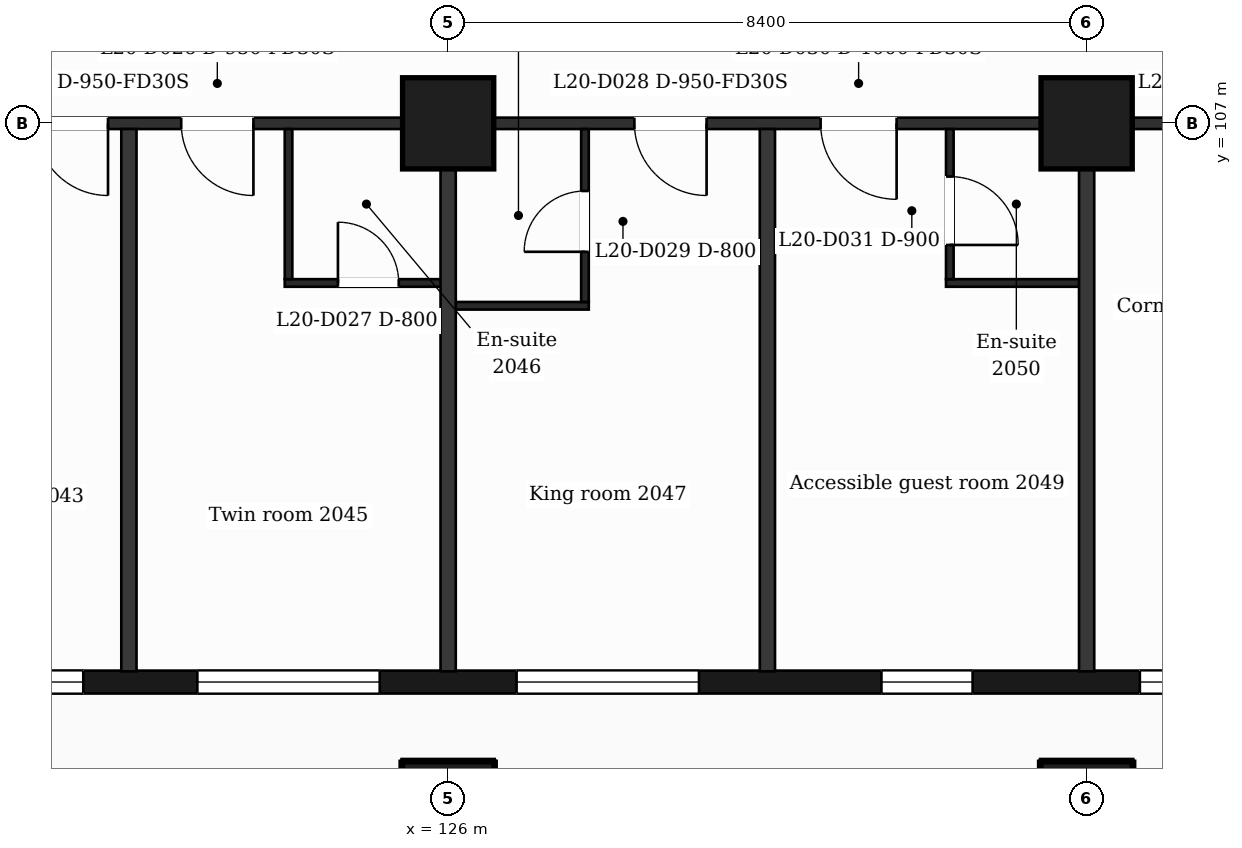
"""IFC4 building model, lengths in metres.
Left out: names, types, materials, properties, quantities, classifications, styles, units other than length and angle.
Written with IfcOpenShell. Run it as: python <this file> out.ifc"""

import sys

from ifc_helpers import new_model, si_unit, direction, frame, frame_2d, origin, origin_2d, place, context, subcontext, project, spatial, rectangle, extrude, element, fill, save


model = new_model("IFC4")
c1 = context("Model", 3, precision=1e-05, world=origin(), true_north=direction((0.0, 1.0)))
c2 = subcontext(c1, "Body", "Model", "MODEL_VIEW")
j1 = project(units=[si_unit("LENGTHUNIT", "METRE"), si_unit("PLANEANGLEUNIT", "RADIAN")], contexts=[c1])
p1 = place(None, origin())
s1 = spatial("IfcSite", under=j1, at=p1, CompositionType="ELEMENT")
p2 = place(p1, origin())
s2 = spatial("IfcBuilding", under=s1, at=p2, CompositionType="ELEMENT")
p3 = place(p2, frame((0.0, 0.0, 91.0)))
s3 = spatial("IfcBuildingStorey", under=s2, at=p3, CompositionType="ELEMENT", Elevation=91.0)
for number, where, z_axis, x_axis in (
    (1, (126.0, 98.0, 0.0), (0.0, 0.0, 1.0), (1.0, 0.0, 0.0)),
    (2, (134.4, 98.0, 0.0), (0.0, 0.0, 1.0), (1.0, 0.0, 0.0)),
    (3, (126.0, 107.0, 0.0), (0.0, 0.0, 1.0), (1.0, 0.0, 0.0)),
    (4, (134.4, 107.0, 0.0), (0.0, 0.0, 1.0), (1.0, 0.0, 0.0)),
):
    element("IfcColumn", number, at=place(p3, frame(where, z_axis=z_axis, x_axis=x_axis)), inside=s3, PredefinedType="COLUMN", context=c2, shape_type="SweptSolid", body=[
        extrude(rectangle(XDim=1.2, YDim=1.2, at=origin_2d()), origin(), (0.0, 0.0, 1.0), 3.7),
    ])
p4 = place(p3, frame((89.85, 99.65, 0.0), z_axis=(0.0, 0.0, 1.0), x_axis=(1.0, 0.0, 0.0)))
e5 = element("IfcWall", 5, at=p4, inside=s3, PredefinedType="SOLIDWALL", context=c2, shape_type="SweptSolid", body=[
    extrude(rectangle(XDim=47.25, YDim=0.3, at=frame_2d((23.625, 0.0))), origin(), (0.0, 0.0, 1.0), 3.38),
])
p5 = place(p4, frame((0.725, 0.0, 0.9)))
e6 = element("IfcOpeningElement", 6, at=p5, cuts=e5, PredefinedType="OPENING", context=c2, shape_type="SweptSolid", body=[
    extrude(rectangle(XDim=1.2, YDim=2.1, at=frame_2d((0.6, 1.05))), frame((0.0, 0.16, 0.0), z_axis=(0.0, -1.0, 0.0), x_axis=(1.0, 0.0, 0.0)), (0.0, 0.0, 1.0), 0.32),
])
p6 = place(p4, frame((3.45, 0.0, 0.9)))
e7 = element("IfcOpeningElement", 7, at=p6, cuts=e5, PredefinedType="OPENING", context=c2, shape_type="SweptSolid", body=[
    extrude(rectangle(XDim=2.4, YDim=2.1, at=frame_2d((1.2, 1.05))), frame((0.0, 0.16, 0.0), z_axis=(0.0, -1.0, 0.0), x_axis=(1.0, 0.0, 0.0)), (0.0, 0.0, 1.0), 0.32),
])
p7 = place(p4, frame((7.65, 0.0, 0.9)))
e8 = element("IfcOpeningElement", 8, at=p7, cuts=e5, PredefinedType="OPENING", context=c2, shape_type="SweptSolid", body=[
    extrude(rectangle(XDim=2.4, YDim=2.1, at=frame_2d((1.2, 1.05))), frame((0.0, 0.16, 0.0), z_axis=(0.0, -1.0, 0.0), x_axis=(1.0, 0.0, 0.0)), (0.0, 0.0, 1.0), 0.32),
])
p8 = place(p4, frame((12.45, 0.0, 0.9)))
e9 = element("IfcOpeningElement", 9, at=p8, cuts=e5, PredefinedType="OPENING", context=c2, shape_type="SweptSolid", body=[
    extrude(rectangle(XDim=1.2, YDim=2.1, at=frame_2d((0.6, 1.05))), frame((0.0, 0.16, 0.0), z_axis=(0.0, -1.0, 0.0), x_axis=(1.0, 0.0, 0.0)), (0.0, 0.0, 1.0), 0.32),
])
p9 = place(p4, frame((16.65, 0.0, 0.9)))
e10 = element("IfcOpeningElement", 10, at=p9, cuts=e5, PredefinedType="OPENING", context=c2, shape_type="SweptSolid", body=[
    extrude(rectangle(XDim=1.2, YDim=2.1, at=frame_2d((0.6, 1.05))), frame((0.0, 0.16, 0.0), z_axis=(0.0, -1.0, 0.0), x_axis=(1.0, 0.0, 0.0)), (0.0, 0.0, 1.0), 0.32),
])
p10 = place(p4, frame((19.95, 0.0, 0.0)))
e11 = element("IfcOpeningElement", 11, at=p10, cuts=e5, PredefinedType="OPENING", context=c2, shape_type="SweptSolid", body=[
    extrude(rectangle(XDim=1.2, YDim=2.4, at=frame_2d((0.6, 1.2))), frame((0.0, 0.16, 0.0), z_axis=(0.0, -1.0, 0.0), x_axis=(1.0, 0.0, 0.0)), (0.0, 0.0, 1.0), 0.32),
])
p11 = place(p4, frame((21.75, 0.0, 0.9)))
e12 = element("IfcOpeningElement", 12, at=p11, cuts=e5, PredefinedType="OPENING", context=c2, shape_type="SweptSolid", body=[
    extrude(rectangle(XDim=1.2, YDim=2.1, at=frame_2d((0.6, 1.05))), frame((0.0, 0.16, 0.0), z_axis=(0.0, -1.0, 0.0), x_axis=(1.0, 0.0, 0.0)), (0.0, 0.0, 1.0), 0.32),
])
p12 = place(p4, frame((24.45, 0.0, 0.9)))
e13 = element("IfcOpeningElement", 13, at=p12, cuts=e5, PredefinedType="OPENING", context=c2, shape_type="SweptSolid", body=[
    extrude(rectangle(XDim=2.4, YDim=2.1, at=frame_2d((1.2, 1.05))), frame((0.0, 0.16, 0.0), z_axis=(0.0, -1.0, 0.0), x_axis=(1.0, 0.0, 0.0)), (0.0, 0.0, 1.0), 0.32),
])
p13 = place(p4, frame((28.35, 0.0, 0.0)))
e14 = element("IfcOpeningElement", 14, at=p13, cuts=e5, PredefinedType="OPENING", context=c2, shape_type="SweptSolid", body=[
    extrude(rectangle(XDim=1.2, YDim=2.4, at=frame_2d((0.6, 1.2))), frame((0.0, 0.16, 0.0), z_axis=(0.0, -1.0, 0.0), x_axis=(1.0, 0.0, 0.0)), (0.0, 0.0, 1.0), 0.32),
])
p14 = place(p4, frame((30.15, 0.0, 0.9)))
e15 = element("IfcOpeningElement", 15, at=p14, cuts=e5, PredefinedType="OPENING", context=c2, shape_type="SweptSolid", body=[
    extrude(rectangle(XDim=1.2, YDim=2.1, at=frame_2d((0.6, 1.05))), frame((0.0, 0.16, 0.0), z_axis=(0.0, -1.0, 0.0), x_axis=(1.0, 0.0, 0.0)), (0.0, 0.0, 1.0), 0.32),
])
p15 = place(p4, frame((32.85, 0.0, 0.9)))
e16 = element("IfcOpeningElement", 16, at=p15, cuts=e5, PredefinedType="OPENING", context=c2, shape_type="SweptSolid", body=[
    extrude(rectangle(XDim=2.4, YDim=2.1, at=frame_2d((1.2, 1.05))), frame((0.0, 0.16, 0.0), z_axis=(0.0, -1.0, 0.0), x_axis=(1.0, 0.0, 0.0)), (0.0, 0.0, 1.0), 0.32),
])
p16 = place(p4, frame((37.05, 0.0, 0.9)))
e17 = element("IfcOpeningElement", 17, at=p16, cuts=e5, PredefinedType="OPENING", context=c2, shape_type="SweptSolid", body=[
    extrude(rectangle(XDim=2.4, YDim=2.1, at=frame_2d((1.2, 1.05))), frame((0.0, 0.16, 0.0), z_axis=(0.0, -1.0, 0.0), x_axis=(1.0, 0.0, 0.0)), (0.0, 0.0, 1.0), 0.32),
])
p17 = place(p4, frame((41.85, 0.0, 0.9)))
e18 = element("IfcOpeningElement", 18, at=p17, cuts=e5, PredefinedType="OPENING", context=c2, shape_type="SweptSolid", body=[
    extrude(rectangle(XDim=1.2, YDim=2.1, at=frame_2d((0.6, 1.05))), frame((0.0, 0.16, 0.0), z_axis=(0.0, -1.0, 0.0), x_axis=(1.0, 0.0, 0.0)), (0.0, 0.0, 1.0), 0.32),
])
p18 = place(p4, frame((45.25, 0.0, 0.9)))
e19 = element("IfcOpeningElement", 19, at=p18, cuts=e5, PredefinedType="OPENING", context=c2, shape_type="SweptSolid", body=[
    extrude(rectangle(XDim=1.2, YDim=2.1, at=frame_2d((0.6, 1.05))), frame((0.0, 0.16, 0.0), z_axis=(0.0, -1.0, 0.0), x_axis=(1.0, 0.0, 0.0)), (0.0, 0.0, 1.0), 0.32),
])
p19 = place(p3, frame((126.0, 104.6, 0.0), z_axis=(0.0, 0.0, 1.0), x_axis=(1.0, 0.0, 0.0)))
e20 = element("IfcWall", 20, at=p19, inside=s3, PredefinedType="PARTITIONING", context=c2, shape_type="SweptSolid", body=[
    extrude(rectangle(XDim=1.85, YDim=0.1, at=frame_2d((0.925, 0.0))), origin(), (0.0, 0.0, 1.0), 3.38),
])
p20 = place(p3, frame((123.85, 104.9, 0.0), z_axis=(0.0, 0.0, 1.0), x_axis=(1.0, 0.0, 0.0)))
e21 = element("IfcWall", 21, at=p20, inside=s3, PredefinedType="PARTITIONING", context=c2, shape_type="SweptSolid", body=[
    extrude(rectangle(XDim=2.15, YDim=0.1, at=frame_2d((1.075, 0.0))), origin(), (0.0, 0.0, 1.0), 3.38),
])
p21 = place(p20, frame((0.7, 0.0, 0.0)))
e22 = element("IfcOpeningElement", 22, at=p21, cuts=e21, PredefinedType="OPENING", context=c2, shape_type="SweptSolid", body=[
    extrude(rectangle(XDim=0.8, YDim=2.1, at=frame_2d((0.4, 1.05))), frame((0.0, 0.06, 0.0), z_axis=(0.0, -1.0, 0.0), x_axis=(1.0, 0.0, 0.0)), (0.0, 0.0, 1.0), 0.12),
])
p22 = place(p3, frame((132.55, 104.9, 0.0), z_axis=(0.0, 0.0, 1.0), x_axis=(1.0, 0.0, 0.0)))
e23 = element("IfcWall", 23, at=p22, inside=s3, PredefinedType="PARTITIONING", context=c2, shape_type="SweptSolid", body=[
    extrude(rectangle(XDim=1.85, YDim=0.1, at=frame_2d((0.925, 0.0))), origin(), (0.0, 0.0, 1.0), 3.38),
])
p23 = place(p3, frame((87.018, 107.0, 0.0), z_axis=(0.0, 0.0, 1.0), x_axis=(1.0, 0.0, 0.0)))
e24 = element("IfcWall", 24, at=p23, inside=s3, PredefinedType="PARTITIONING", context=c2, shape_type="SweptSolid", body=[
    extrude(rectangle(XDim=52.765, YDim=0.15, at=frame_2d((26.382, 0.0))), origin(), (0.0, 0.0, 1.0), 3.38),
])
p24 = place(p23, frame((1.276, 0.0, 0.0)))
e25 = element("IfcOpeningElement", 25, at=p24, cuts=e24, PredefinedType="OPENING", context=c2, shape_type="SweptSolid", body=[
    extrude(rectangle(XDim=0.95, YDim=2.1, at=frame_2d((0.475, 1.05))), frame((0.0, 0.085, 0.0), z_axis=(0.0, -1.0, 0.0), x_axis=(1.0, 0.0, 0.0)), (0.0, 0.0, 1.0), 0.17),
])
p25 = place(p23, frame((6.752, 0.0, 0.0)))
e26 = element("IfcOpeningElement", 26, at=p25, cuts=e24, PredefinedType="OPENING", context=c2, shape_type="SweptSolid", body=[
    extrude(rectangle(XDim=0.95, YDim=2.1, at=frame_2d((0.475, 1.05))), frame((0.0, 0.085, 0.0), z_axis=(0.0, -1.0, 0.0), x_axis=(1.0, 0.0, 0.0)), (0.0, 0.0, 1.0), 0.17),
])
p26 = place(p23, frame((11.982, 0.0, 0.0)))
e27 = element("IfcOpeningElement", 27, at=p26, cuts=e24, PredefinedType="OPENING", context=c2, shape_type="SweptSolid", body=[
    extrude(rectangle(XDim=0.95, YDim=2.1, at=frame_2d((0.475, 1.05))), frame((0.0, 0.085, 0.0), z_axis=(0.0, -1.0, 0.0), x_axis=(1.0, 0.0, 0.0)), (0.0, 0.0, 1.0), 0.17),
])
p27 = place(p23, frame((16.457, 0.0, 0.0)))
e28 = element("IfcOpeningElement", 28, at=p27, cuts=e24, PredefinedType="OPENING", context=c2, shape_type="SweptSolid", body=[
    extrude(rectangle(XDim=0.95, YDim=2.1, at=frame_2d((0.475, 1.05))), frame((0.0, 0.085, 0.0), z_axis=(0.0, -1.0, 0.0), x_axis=(1.0, 0.0, 0.0)), (0.0, 0.0, 1.0), 0.17),
])
p28 = place(p23, frame((24.857, 0.0, 0.0)))
e29 = element("IfcOpeningElement", 29, at=p28, cuts=e24, PredefinedType="OPENING", context=c2, shape_type="SweptSolid", body=[
    extrude(rectangle(XDim=0.95, YDim=2.1, at=frame_2d((0.475, 1.05))), frame((0.0, 0.085, 0.0), z_axis=(0.0, -1.0, 0.0), x_axis=(1.0, 0.0, 0.0)), (0.0, 0.0, 1.0), 0.17),
])
p29 = place(p23, frame((26.845, 0.0, 0.0)))
e30 = element("IfcOpeningElement", 30, at=p29, cuts=e24, PredefinedType="OPENING", context=c2, shape_type="SweptSolid", body=[
    extrude(rectangle(XDim=0.95, YDim=2.1, at=frame_2d((0.475, 1.05))), frame((0.0, 0.085, 0.0), z_axis=(0.0, -1.0, 0.0), x_axis=(1.0, 0.0, 0.0)), (0.0, 0.0, 1.0), 0.17),
])
p30 = place(p23, frame((33.557, 0.0, 0.0)))
e31 = element("IfcOpeningElement", 31, at=p30, cuts=e24, PredefinedType="OPENING", context=c2, shape_type="SweptSolid", body=[
    extrude(rectangle(XDim=0.95, YDim=2.1, at=frame_2d((0.475, 1.05))), frame((0.0, 0.085, 0.0), z_axis=(0.0, -1.0, 0.0), x_axis=(1.0, 0.0, 0.0)), (0.0, 0.0, 1.0), 0.17),
])
p31 = place(p23, frame((35.47, 0.0, 0.0)))
e32 = element("IfcOpeningElement", 32, at=p31, cuts=e24, PredefinedType="OPENING", context=c2, shape_type="SweptSolid", body=[
    extrude(rectangle(XDim=0.95, YDim=2.1, at=frame_2d((0.475, 1.05))), frame((0.0, 0.085, 0.0), z_axis=(0.0, -1.0, 0.0), x_axis=(1.0, 0.0, 0.0)), (0.0, 0.0, 1.0), 0.17),
])
p32 = place(p23, frame((41.432, 0.0, 0.0)))
e33 = element("IfcOpeningElement", 33, at=p32, cuts=e24, PredefinedType="OPENING", context=c2, shape_type="SweptSolid", body=[
    extrude(rectangle(XDim=0.95, YDim=2.1, at=frame_2d((0.475, 1.05))), frame((0.0, 0.085, 0.0), z_axis=(0.0, -1.0, 0.0), x_axis=(1.0, 0.0, 0.0)), (0.0, 0.0, 1.0), 0.17),
])
p33 = place(p23, frame((43.882, 0.0, 0.0)))
e34 = element("IfcOpeningElement", 34, at=p33, cuts=e24, PredefinedType="OPENING", context=c2, shape_type="SweptSolid", body=[
    extrude(rectangle(XDim=1.0, YDim=2.1, at=frame_2d((0.5, 1.05))), frame((0.0, 0.085, 0.0), z_axis=(0.0, -1.0, 0.0), x_axis=(1.0, 0.0, 0.0)), (0.0, 0.0, 1.0), 0.17),
])
p34 = place(p23, frame((48.974, 0.0, 0.0)))
e35 = element("IfcOpeningElement", 35, at=p34, cuts=e24, PredefinedType="OPENING", context=c2, shape_type="SweptSolid", body=[
    extrude(rectangle(XDim=0.95, YDim=2.1, at=frame_2d((0.475, 1.05))), frame((0.0, 0.085, 0.0), z_axis=(0.0, -1.0, 0.0), x_axis=(1.0, 0.0, 0.0)), (0.0, 0.0, 1.0), 0.17),
])
p35 = place(p3, frame((121.8, 99.79, 0.0), z_axis=(0.0, 0.0, 1.0), x_axis=(0.0, 1.0, 0.0)))
e36 = element("IfcWall", 36, at=p35, inside=s3, PredefinedType="PARTITIONING", context=c2, shape_type="SweptSolid", body=[
    extrude(rectangle(XDim=7.135, YDim=0.2, at=frame_2d((3.567, 0.0))), origin(), (0.0, 0.0, 1.0), 3.38),
])
p36 = place(p3, frame((123.9, 104.95, 0.0), z_axis=(0.0, 0.0, 1.0), x_axis=(0.0, 1.0, 0.0)))
e37 = element("IfcWall", 37, at=p36, inside=s3, PredefinedType="PARTITIONING", context=c2, shape_type="SweptSolid", body=[
    extrude(rectangle(XDim=1.975, YDim=0.1, at=frame_2d((0.988, 0.0))), origin(), (0.0, 0.0, 1.0), 3.38),
])
p37 = place(p3, frame((126.0, 99.79, 0.0), z_axis=(0.0, 0.0, 1.0), x_axis=(0.0, 1.0, 0.0)))
e38 = element("IfcWall", 38, at=p37, inside=s3, PredefinedType="PARTITIONING", context=c2, shape_type="SweptSolid", body=[
    extrude(rectangle(XDim=7.135, YDim=0.2, at=frame_2d((3.567, 0.0))), origin(), (0.0, 0.0, 1.0), 3.38),
])
p38 = place(p3, frame((127.8, 104.65, 0.0), z_axis=(0.0, 0.0, 1.0), x_axis=(0.0, 1.0, 0.0)))
e39 = element("IfcWall", 39, at=p38, inside=s3, PredefinedType="PARTITIONING", context=c2, shape_type="SweptSolid", body=[
    extrude(rectangle(XDim=2.275, YDim=0.1, at=frame_2d((1.138, 0.0))), origin(), (0.0, 0.0, 1.0), 3.38),
])
p39 = place(p38, frame((0.66, 0.0, 0.0)))
e40 = element("IfcOpeningElement", 40, at=p39, cuts=e39, PredefinedType="OPENING", context=c2, shape_type="SweptSolid", body=[
    extrude(rectangle(XDim=0.8, YDim=2.1, at=frame_2d((0.4, 1.05))), frame((0.0, 0.06, 0.0), z_axis=(0.0, -1.0, 0.0), x_axis=(1.0, 0.0, 0.0)), (0.0, 0.0, 1.0), 0.12),
])
p40 = place(p3, frame((130.2, 99.79, 0.0), z_axis=(0.0, 0.0, 1.0), x_axis=(0.0, 1.0, 0.0)))
e41 = element("IfcWall", 41, at=p40, inside=s3, PredefinedType="PARTITIONING", context=c2, shape_type="SweptSolid", body=[
    extrude(rectangle(XDim=7.135, YDim=0.2, at=frame_2d((3.567, 0.0))), origin(), (0.0, 0.0, 1.0), 3.38),
])
p41 = place(p3, frame((132.6, 104.95, 0.0), z_axis=(0.0, 0.0, 1.0), x_axis=(0.0, 1.0, 0.0)))
e42 = element("IfcWall", 42, at=p41, inside=s3, PredefinedType="PARTITIONING", context=c2, shape_type="SweptSolid", body=[
    extrude(rectangle(XDim=1.975, YDim=0.1, at=frame_2d((0.988, 0.0))), origin(), (0.0, 0.0, 1.0), 3.38),
])
p42 = place(p41, frame((0.45, 0.0, 0.0)))
e43 = element("IfcOpeningElement", 43, at=p42, cuts=e42, PredefinedType="OPENING", context=c2, shape_type="SweptSolid", body=[
    extrude(rectangle(XDim=0.9, YDim=2.1, at=frame_2d((0.45, 1.05))), frame((0.0, 0.06, 0.0), z_axis=(0.0, -1.0, 0.0), x_axis=(1.0, 0.0, 0.0)), (0.0, 0.0, 1.0), 0.12),
])
p43 = place(p3, frame((134.4, 99.79, 0.0), z_axis=(0.0, 0.0, 1.0), x_axis=(0.0, 1.0, 0.0)))
e44 = element("IfcWall", 44, at=p43, inside=s3, PredefinedType="PARTITIONING", context=c2, shape_type="SweptSolid", body=[
    extrude(rectangle(XDim=7.135, YDim=0.2, at=frame_2d((3.567, 0.0))), origin(), (0.0, 0.0, 1.0), 3.38),
])
p44 = place(p14, origin())
e45 = element("IfcWindow", 45, at=p44, inside=s3, PartitioningType="SINGLE_PANEL", PredefinedType="WINDOW", context=c2, shape_type="SweptSolid", body=[
    extrude(rectangle(XDim=1.2, YDim=2.1, at=frame_2d((0.6, 1.05))), frame((0.0, 0.03, 0.0), z_axis=(0.0, -1.0, 0.0), x_axis=(1.0, 0.0, 0.0)), (0.0, 0.0, 1.0), 0.06),
])
fill(e15, e45)
p45 = place(p15, origin())
e46 = element("IfcWindow", 46, at=p45, inside=s3, PartitioningType="SINGLE_PANEL", PredefinedType="WINDOW", context=c2, shape_type="SweptSolid", body=[
    extrude(rectangle(XDim=2.4, YDim=2.1, at=frame_2d((1.2, 1.05))), frame((0.0, 0.03, 0.0), z_axis=(0.0, -1.0, 0.0), x_axis=(1.0, 0.0, 0.0)), (0.0, 0.0, 1.0), 0.06),
])
fill(e16, e46)
p46 = place(p16, origin())
e47 = element("IfcWindow", 47, at=p46, inside=s3, PartitioningType="SINGLE_PANEL", PredefinedType="WINDOW", context=c2, shape_type="SweptSolid", body=[
    extrude(rectangle(XDim=2.4, YDim=2.1, at=frame_2d((1.2, 1.05))), frame((0.0, 0.03, 0.0), z_axis=(0.0, -1.0, 0.0), x_axis=(1.0, 0.0, 0.0)), (0.0, 0.0, 1.0), 0.06),
])
fill(e17, e47)
p47 = place(p17, origin())
e48 = element("IfcWindow", 48, at=p47, inside=s3, PartitioningType="SINGLE_PANEL", PredefinedType="WINDOW", context=c2, shape_type="SweptSolid", body=[
    extrude(rectangle(XDim=1.2, YDim=2.1, at=frame_2d((0.6, 1.05))), frame((0.0, 0.03, 0.0), z_axis=(0.0, -1.0, 0.0), x_axis=(1.0, 0.0, 0.0)), (0.0, 0.0, 1.0), 0.06),
])
fill(e18, e48)
p48 = place(p18, origin())
e49 = element("IfcWindow", 49, at=p48, inside=s3, PartitioningType="SINGLE_PANEL", PredefinedType="WINDOW", context=c2, shape_type="SweptSolid", body=[
    extrude(rectangle(XDim=1.2, YDim=2.1, at=frame_2d((0.6, 1.05))), frame((0.0, 0.03, 0.0), z_axis=(0.0, -1.0, 0.0), x_axis=(1.0, 0.0, 0.0)), (0.0, 0.0, 1.0), 0.06),
])
fill(e19, e49)
p49 = place(p30, origin())
e50 = element("IfcDoor", 50, at=p49, inside=s3, OperationType="SINGLE_SWING_RIGHT", PredefinedType="DOOR", context=c2, shape_type="SweptSolid", body=[
    extrude(rectangle(XDim=0.95, YDim=2.1, at=frame_2d((0.475, 1.05))), frame((0.0, 0.025, 0.0), z_axis=(0.0, -1.0, 0.0), x_axis=(1.0, 0.0, 0.0)), (0.0, 0.0, 1.0), 0.05),
])
fill(e31, e50)
p50 = place(p31, origin())
e51 = element("IfcDoor", 51, at=p50, inside=s3, OperationType="SINGLE_SWING_RIGHT", PredefinedType="DOOR", context=c2, shape_type="SweptSolid", body=[
    extrude(rectangle(XDim=0.95, YDim=2.1, at=frame_2d((0.475, 1.05))), frame((0.0, 0.025, 0.0), z_axis=(0.0, -1.0, 0.0), x_axis=(1.0, 0.0, 0.0)), (0.0, 0.0, 1.0), 0.05),
])
fill(e32, e51)
p51 = place(p21, origin())
e52 = element("IfcDoor", 52, at=p51, inside=s3, OperationType="SINGLE_SWING_LEFT", PredefinedType="DOOR", context=c2, shape_type="SweptSolid", body=[
    extrude(rectangle(XDim=0.8, YDim=2.1, at=frame_2d((0.4, 1.05))), frame((0.0, 0.025, 0.0), z_axis=(0.0, -1.0, 0.0), x_axis=(1.0, 0.0, 0.0)), (0.0, 0.0, 1.0), 0.05),
])
fill(e22, e52)
p52 = place(p32, origin())
e53 = element("IfcDoor", 53, at=p52, inside=s3, OperationType="SINGLE_SWING_RIGHT", PredefinedType="DOOR", context=c2, shape_type="SweptSolid", body=[
    extrude(rectangle(XDim=0.95, YDim=2.1, at=frame_2d((0.475, 1.05))), frame((0.0, 0.025, 0.0), z_axis=(0.0, -1.0, 0.0), x_axis=(1.0, 0.0, 0.0)), (0.0, 0.0, 1.0), 0.05),
])
fill(e33, e53)
p53 = place(p39, origin())
e54 = element("IfcDoor", 54, at=p53, inside=s3, OperationType="SINGLE_SWING_LEFT", PredefinedType="DOOR", context=c2, shape_type="SweptSolid", body=[
    extrude(rectangle(XDim=0.8, YDim=2.1, at=frame_2d((0.4, 1.05))), frame((0.0, 0.025, 0.0), z_axis=(0.0, -1.0, 0.0), x_axis=(1.0, 0.0, 0.0)), (0.0, 0.0, 1.0), 0.05),
])
fill(e40, e54)
p54 = place(p33, origin())
e55 = element("IfcDoor", 55, at=p54, inside=s3, OperationType="SINGLE_SWING_RIGHT", PredefinedType="DOOR", context=c2, shape_type="SweptSolid", body=[
    extrude(rectangle(XDim=1.0, YDim=2.1, at=frame_2d((0.5, 1.05))), frame((0.0, 0.025, 0.0), z_axis=(0.0, -1.0, 0.0), x_axis=(1.0, 0.0, 0.0)), (0.0, 0.0, 1.0), 0.05),
])
fill(e34, e55)
p55 = place(p42, origin())
e56 = element("IfcDoor", 56, at=p55, inside=s3, OperationType="SINGLE_SWING_LEFT", PredefinedType="DOOR", context=c2, shape_type="SweptSolid", body=[
    extrude(rectangle(XDim=0.9, YDim=2.1, at=frame_2d((0.45, 1.05))), frame((0.0, 0.025, 0.0), z_axis=(0.0, -1.0, 0.0), x_axis=(1.0, 0.0, 0.0)), (0.0, 0.0, 1.0), 0.05),
])
fill(e43, e56)
save(model, sys.argv[1])
